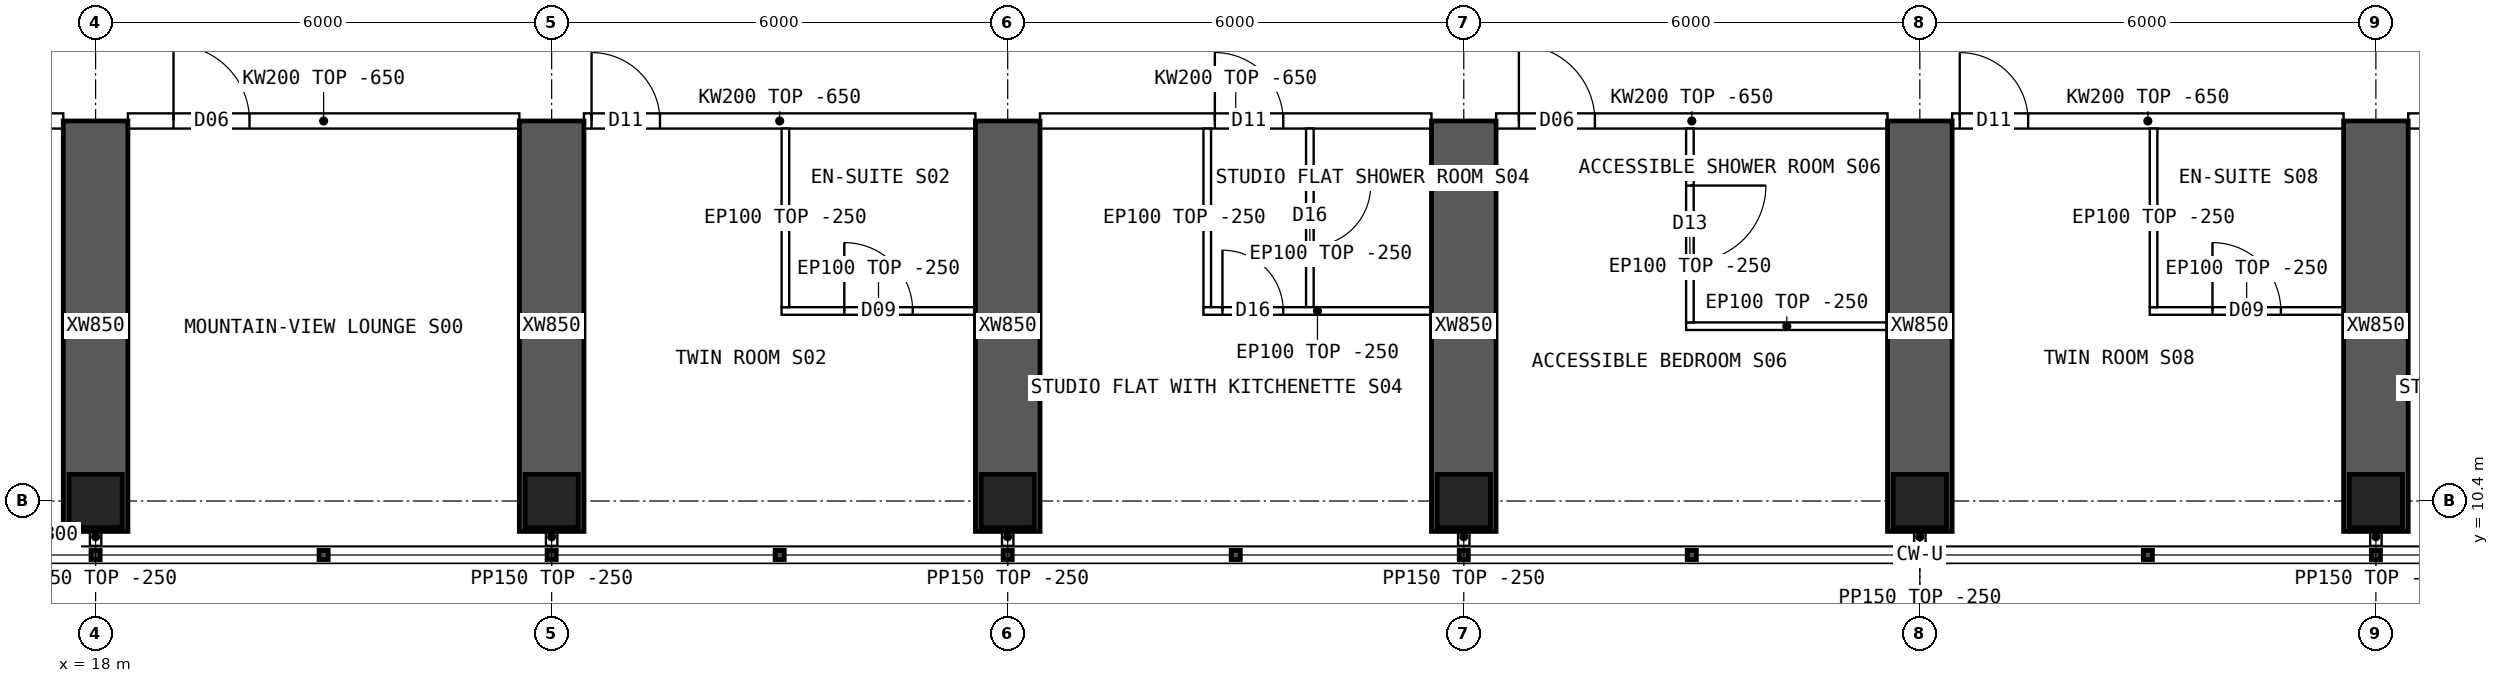
"""IFC4 building model, lengths in metres.
Left out: names, types, materials, properties, quantities, classifications, styles, units other than length and angle.
Written with IfcOpenShell. Run it as: python <this file> out.ifc"""

import sys

from ifc_helpers import new_model, si_unit, direction, frame, frame_2d, origin, origin_2d, place, context, subcontext, project, spatial, polyline, rectangle, hollow_rectangle, outline, extrude, element, fill, save


model = new_model("IFC4")
c1 = context("Model", 3, precision=1e-05, world=origin(), true_north=direction((0.0, 1.0)))
c2 = subcontext(c1, "Body", "Model", "MODEL_VIEW")
j1 = project(units=[si_unit("LENGTHUNIT", "METRE"), si_unit("PLANEANGLEUNIT", "RADIAN")], contexts=[c1])
p1 = place(None, origin())
s1 = spatial("IfcSite", under=j1, at=p1, CompositionType="ELEMENT")
p2 = place(p1, origin())
s2 = spatial("IfcBuilding", under=s1, at=p2, CompositionType="ELEMENT")
p3 = place(p2, frame((0.0, 0.0, 152.35)))
s3 = spatial("IfcBuildingStorey", under=s2, at=p3, CompositionType="ELEMENT", Elevation=152.35)
for number, where, z_axis, x_axis in (
    (1, (18.0, 10.4, 0.0), (0.0, 0.0, 1.0), (1.0, 0.0, 0.0)),
    (2, (24.0, 10.4, 0.0), (0.0, 0.0, 1.0), (1.0, 0.0, 0.0)),
    (3, (30.0, 10.4, 0.0), (0.0, 0.0, 1.0), (1.0, 0.0, 0.0)),
    (4, (36.0, 10.4, 0.0), (0.0, 0.0, 1.0), (1.0, 0.0, 0.0)),
    (5, (42.0, 10.4, 0.0), (0.0, 0.0, 1.0), (1.0, 0.0, 0.0)),
    (6, (48.0, 10.4, 0.0), (0.0, 0.0, 1.0), (1.0, 0.0, 0.0)),
):
    element("IfcColumn", number, at=place(p3, frame(where, z_axis=z_axis, x_axis=x_axis)), inside=s3, PredefinedType="COLUMN", context=c2, shape_type="SweptSolid", body=[
        extrude(hollow_rectangle(XDim=0.7, YDim=0.7, WallThickness=0.07, at=origin_2d()), origin(), (0.0, 0.0, 1.0), 3.75),
    ])
for number, where, z_axis, x_axis in (
    (7, (18.0, 10.0, 0.0), (0.0, 0.0, 1.0), (0.0, 1.0, 0.0)),
    (8, (24.0, 10.0, 0.0), (0.0, 0.0, 1.0), (0.0, 1.0, 0.0)),
    (9, (30.0, 10.0, 0.0), (0.0, 0.0, 1.0), (0.0, 1.0, 0.0)),
    (10, (36.0, 10.0, 0.0), (0.0, 0.0, 1.0), (0.0, 1.0, 0.0)),
    (11, (42.0, 10.0, 0.0), (0.0, 0.0, 1.0), (0.0, 1.0, 0.0)),
    (12, (48.0, 10.0, 0.0), (0.0, 0.0, 1.0), (0.0, 1.0, 0.0)),
):
    element("IfcWall", number, at=place(p3, frame(where, z_axis=z_axis, x_axis=x_axis)), inside=s3, PredefinedType="SHEAR", context=c2, shape_type="SweptSolid", body=[
        extrude(rectangle(XDim=5.4, YDim=0.85, at=frame_2d((2.7, 0.0))), origin(), (0.0, 0.0, 1.0), 3.75),
    ])
p4 = place(p3, frame((17.2, 9.95, 0.0), z_axis=(0.0, 0.0, 1.0), x_axis=(1.0, 0.0, 0.0)))
e13 = element("IfcWall", 13, at=p4, inside=s3, PredefinedType="SOLIDWALL", context=c2, shape_type="SweptSolid", body=[
    extrude(rectangle(XDim=0.375, YDim=0.3, at=frame_2d((0.188, 0.0))), origin(), (0.0, 0.0, 1.0), 3.5),
])
p5 = place(p3, frame((15.6, 15.4, 0.0), z_axis=(0.0, 0.0, 1.0), x_axis=(1.0, 0.0, 0.0)))
e14 = element("IfcWall", 14, at=p5, inside=s3, PredefinedType="SOLIDWALL", context=c2, shape_type="SweptSolid", body=[
    extrude(rectangle(XDim=1.975, YDim=0.2, at=frame_2d((0.987, 0.0))), origin(), (0.0, 0.0, 1.0), 3.5),
])
p6 = place(p5, frame((0.875, 0.0, 0.0)))
e15 = element("IfcOpeningElement", 15, at=p6, cuts=e14, PredefinedType="OPENING", context=c2, shape_type="SweptSolid", body=[
    extrude(rectangle(XDim=0.9, YDim=2.1, at=frame_2d((0.45, 1.05))), frame((0.0, 0.11, 0.0), z_axis=(0.0, -1.0, 0.0), x_axis=(1.0, 0.0, 0.0)), (0.0, 0.0, 1.0), 0.22),
])
p7 = place(p3, frame((18.425, 15.4, 0.0), z_axis=(0.0, 0.0, 1.0), x_axis=(1.0, 0.0, 0.0)))
e16 = element("IfcWall", 16, at=p7, inside=s3, PredefinedType="SOLIDWALL", context=c2, shape_type="SweptSolid", body=[
    extrude(outline(polyline([(0.0, 0.0), (5.15, 0.0), (5.15, 3.1), (0.0, 3.1), (0.0, 0.0)])), frame((0.0, 0.1, 0.0), z_axis=(0.0, -1.0, 0.0), x_axis=(1.0, 0.0, 0.0)), (0.0, 0.0, 1.0), 0.2),
])
p8 = place(p7, frame((0.6, 0.0, 0.0)))
e17 = element("IfcOpeningElement", 17, at=p8, cuts=e16, PredefinedType="OPENING", context=c2, shape_type="SweptSolid", body=[
    extrude(rectangle(XDim=1.0, YDim=2.1, at=frame_2d((0.5, 1.05))), frame((0.0, 0.11, 0.0), z_axis=(0.0, -1.0, 0.0), x_axis=(1.0, 0.0, 0.0)), (0.0, 0.0, 1.0), 0.22),
])
p9 = place(p3, frame((24.425, 15.4, 0.0), z_axis=(0.0, 0.0, 1.0), x_axis=(1.0, 0.0, 0.0)))
e18 = element("IfcWall", 18, at=p9, inside=s3, PredefinedType="SOLIDWALL", context=c2, shape_type="SweptSolid", body=[
    extrude(outline(polyline([(0.0, 0.0), (5.15, 0.0), (5.15, 3.1), (0.0, 3.1), (0.0, 0.0)])), frame((0.0, 0.1, 0.0), z_axis=(0.0, -1.0, 0.0), x_axis=(1.0, 0.0, 0.0)), (0.0, 0.0, 1.0), 0.2),
])
p10 = place(p9, frame((0.1, 0.0, 0.0)))
e19 = element("IfcOpeningElement", 19, at=p10, cuts=e18, PredefinedType="OPENING", context=c2, shape_type="SweptSolid", body=[
    extrude(rectangle(XDim=0.9, YDim=2.1, at=frame_2d((0.45, 1.05))), frame((0.0, 0.11, 0.0), z_axis=(0.0, -1.0, 0.0), x_axis=(1.0, 0.0, 0.0)), (0.0, 0.0, 1.0), 0.22),
])
p11 = place(p3, frame((30.425, 15.4, 0.0), z_axis=(0.0, 0.0, 1.0), x_axis=(1.0, 0.0, 0.0)))
e20 = element("IfcWall", 20, at=p11, inside=s3, PredefinedType="SOLIDWALL", context=c2, shape_type="SweptSolid", body=[
    extrude(outline(polyline([(0.0, 0.0), (5.15, 0.0), (5.15, 3.1), (0.0, 3.1), (0.0, 0.0)])), frame((0.0, 0.1, 0.0), z_axis=(0.0, -1.0, 0.0), x_axis=(1.0, 0.0, 0.0)), (0.0, 0.0, 1.0), 0.2),
])
p12 = place(p11, frame((2.3, 0.0, 0.0)))
e21 = element("IfcOpeningElement", 21, at=p12, cuts=e20, PredefinedType="OPENING", context=c2, shape_type="SweptSolid", body=[
    extrude(rectangle(XDim=0.9, YDim=2.1, at=frame_2d((0.45, 1.05))), frame((0.0, 0.11, 0.0), z_axis=(0.0, -1.0, 0.0), x_axis=(1.0, 0.0, 0.0)), (0.0, 0.0, 1.0), 0.22),
])
p13 = place(p3, frame((36.425, 15.4, 0.0), z_axis=(0.0, 0.0, 1.0), x_axis=(1.0, 0.0, 0.0)))
e22 = element("IfcWall", 22, at=p13, inside=s3, PredefinedType="SOLIDWALL", context=c2, shape_type="SweptSolid", body=[
    extrude(outline(polyline([(0.0, 0.0), (5.15, 0.0), (5.15, 3.1), (0.0, 3.1), (0.0, 0.0)])), frame((0.0, 0.1, 0.0), z_axis=(0.0, -1.0, 0.0), x_axis=(1.0, 0.0, 0.0)), (0.0, 0.0, 1.0), 0.2),
])
p14 = place(p13, frame((0.3, 0.0, 0.0)))
e23 = element("IfcOpeningElement", 23, at=p14, cuts=e22, PredefinedType="OPENING", context=c2, shape_type="SweptSolid", body=[
    extrude(rectangle(XDim=1.0, YDim=2.1, at=frame_2d((0.5, 1.05))), frame((0.0, 0.11, 0.0), z_axis=(0.0, -1.0, 0.0), x_axis=(1.0, 0.0, 0.0)), (0.0, 0.0, 1.0), 0.22),
])
p15 = place(p3, frame((42.425, 15.4, 0.0), z_axis=(0.0, 0.0, 1.0), x_axis=(1.0, 0.0, 0.0)))
e24 = element("IfcWall", 24, at=p15, inside=s3, PredefinedType="SOLIDWALL", context=c2, shape_type="SweptSolid", body=[
    extrude(outline(polyline([(0.0, 0.0), (5.15, 0.0), (5.15, 3.1), (0.0, 3.1), (0.0, 0.0)])), frame((0.0, 0.1, 0.0), z_axis=(0.0, -1.0, 0.0), x_axis=(1.0, 0.0, 0.0)), (0.0, 0.0, 1.0), 0.2),
])
p16 = place(p15, frame((0.1, 0.0, 0.0)))
e25 = element("IfcOpeningElement", 25, at=p16, cuts=e24, PredefinedType="OPENING", context=c2, shape_type="SweptSolid", body=[
    extrude(rectangle(XDim=0.9, YDim=2.1, at=frame_2d((0.45, 1.05))), frame((0.0, 0.11, 0.0), z_axis=(0.0, -1.0, 0.0), x_axis=(1.0, 0.0, 0.0)), (0.0, 0.0, 1.0), 0.22),
])
p17 = place(p3, frame((48.425, 15.4, 0.0), z_axis=(0.0, 0.0, 1.0), x_axis=(1.0, 0.0, 0.0)))
e26 = element("IfcWall", 26, at=p17, inside=s3, PredefinedType="SOLIDWALL", context=c2, shape_type="SweptSolid", body=[
    extrude(outline(polyline([(0.0, 0.0), (5.15, 0.0), (5.15, 3.1), (0.0, 3.1), (0.0, 0.0)])), frame((0.0, 0.1, 0.0), z_axis=(0.0, -1.0, 0.0), x_axis=(1.0, 0.0, 0.0)), (0.0, 0.0, 1.0), 0.2),
])
p18 = place(p17, frame((2.3, 0.0, 0.0)))
e27 = element("IfcOpeningElement", 27, at=p18, cuts=e26, PredefinedType="OPENING", context=c2, shape_type="SweptSolid", body=[
    extrude(rectangle(XDim=0.9, YDim=2.1, at=frame_2d((0.45, 1.05))), frame((0.0, 0.11, 0.0), z_axis=(0.0, -1.0, 0.0), x_axis=(1.0, 0.0, 0.0)), (0.0, 0.0, 1.0), 0.22),
])
p19 = place(p3, frame((29.575, 12.9, 0.0), z_axis=(0.0, 0.0, 1.0), x_axis=(-1.0, 0.0, 0.0)))
e28 = element("IfcWall", 28, at=p19, inside=s3, PredefinedType="PARTITIONING", context=c2, shape_type="SweptSolid", body=[
    extrude(rectangle(XDim=2.55, YDim=0.1, at=frame_2d((1.275, 0.0))), origin(), (0.0, 0.0, 1.0), 3.5),
])
p20 = place(p19, frame((0.825, 0.0, 0.0)))
e29 = element("IfcOpeningElement", 29, at=p20, cuts=e28, PredefinedType="OPENING", context=c2, shape_type="SweptSolid", body=[
    extrude(rectangle(XDim=0.9, YDim=2.1, at=frame_2d((0.45, 1.05))), frame((0.0, 0.06, 0.0), z_axis=(0.0, -1.0, 0.0), x_axis=(1.0, 0.0, 0.0)), (0.0, 0.0, 1.0), 0.12),
])
p21 = place(p3, frame((27.075, 12.95, 0.0), z_axis=(0.0, 0.0, 1.0), x_axis=(0.0, 1.0, 0.0)))
e30 = element("IfcWall", 30, at=p21, inside=s3, PredefinedType="PARTITIONING", context=c2, shape_type="SweptSolid", body=[
    extrude(outline(polyline([(0.0, 0.0), (2.35, 0.0), (2.35, 3.1), (2.302, 3.1), (2.3, 3.5), (0.0, 3.5), (0.0, 0.0)])), frame((0.0, 0.05, 0.0), z_axis=(0.0, -1.0, 0.0), x_axis=(1.0, 0.0, 0.0)), (0.0, 0.0, 1.0), 0.1),
])
p22 = place(p3, frame((35.575, 12.9, 0.0), z_axis=(0.0, 0.0, 1.0), x_axis=(-1.0, 0.0, 0.0)))
e31 = element("IfcWall", 31, at=p22, inside=s3, PredefinedType="PARTITIONING", context=c2, shape_type="SweptSolid", body=[
    extrude(rectangle(XDim=3.0, YDim=0.1, at=frame_2d((1.5, 0.0))), origin(), (0.0, 0.0, 1.0), 3.5),
])
p23 = place(p22, frame((1.95, 0.0, 0.0)))
e32 = element("IfcOpeningElement", 32, at=p23, cuts=e31, PredefinedType="OPENING", context=c2, shape_type="SweptSolid", body=[
    extrude(rectangle(XDim=0.8, YDim=2.1, at=frame_2d((0.4, 1.05))), frame((0.0, 0.06, 0.0), z_axis=(0.0, -1.0, 0.0), x_axis=(1.0, 0.0, 0.0)), (0.0, 0.0, 1.0), 0.12),
])
p24 = place(p3, frame((32.625, 12.95, 0.0), z_axis=(0.0, 0.0, 1.0), x_axis=(0.0, 1.0, 0.0)))
e33 = element("IfcWall", 33, at=p24, inside=s3, PredefinedType="PARTITIONING", context=c2, shape_type="SweptSolid", body=[
    extrude(outline(polyline([(0.0, 0.0), (2.35, 0.0), (2.35, 3.1), (2.302, 3.1), (2.3, 3.5), (0.0, 3.5), (0.0, 0.0)])), frame((0.0, 0.05, 0.0), z_axis=(0.0, -1.0, 0.0), x_axis=(1.0, 0.0, 0.0)), (0.0, 0.0, 1.0), 0.1),
])
p25 = place(p3, frame((33.975, 12.95, 0.0), z_axis=(0.0, 0.0, 1.0), x_axis=(0.0, 1.0, 0.0)))
e34 = element("IfcWall", 34, at=p25, inside=s3, PredefinedType="PARTITIONING", context=c2, shape_type="SweptSolid", body=[
    extrude(outline(polyline([(0.0, 0.0), (2.35, 0.0), (2.35, 3.1), (2.302, 3.1), (2.3, 3.5), (0.0, 3.5), (0.0, 0.0)])), frame((0.0, 0.05, 0.0), z_axis=(0.0, -1.0, 0.0), x_axis=(1.0, 0.0, 0.0)), (0.0, 0.0, 1.0), 0.1),
])
p26 = place(p25, frame((0.8, 0.0, 0.0)))
e35 = element("IfcOpeningElement", 35, at=p26, cuts=e34, PredefinedType="OPENING", context=c2, shape_type="SweptSolid", body=[
    extrude(rectangle(XDim=0.8, YDim=2.1, at=frame_2d((0.4, 1.05))), frame((0.0, 0.06, 0.0), z_axis=(0.0, -1.0, 0.0), x_axis=(1.0, 0.0, 0.0)), (0.0, 0.0, 1.0), 0.12),
])
p27 = place(p3, frame((38.925, 12.7, 0.0), z_axis=(0.0, 0.0, 1.0), x_axis=(1.0, 0.0, 0.0)))
e36 = element("IfcWall", 36, at=p27, inside=s3, PredefinedType="PARTITIONING", context=c2, shape_type="SweptSolid", body=[
    extrude(rectangle(XDim=2.65, YDim=0.1, at=frame_2d((1.325, 0.0))), origin(), (0.0, 0.0, 1.0), 3.5),
])
p28 = place(p3, frame((38.975, 12.75, 0.0), z_axis=(0.0, 0.0, 1.0), x_axis=(0.0, 1.0, 0.0)))
e37 = element("IfcWall", 37, at=p28, inside=s3, PredefinedType="PARTITIONING", context=c2, shape_type="SweptSolid", body=[
    extrude(outline(polyline([(0.0, 0.0), (2.55, 0.0), (2.55, 3.1), (2.502, 3.1), (2.5, 3.5), (0.0, 3.5), (0.0, 0.0)])), frame((0.0, 0.05, 0.0), z_axis=(0.0, -1.0, 0.0), x_axis=(1.0, 0.0, 0.0)), (0.0, 0.0, 1.0), 0.1),
])
p29 = place(p28, frame((0.8, 0.0, 0.0)))
e38 = element("IfcOpeningElement", 38, at=p29, cuts=e37, PredefinedType="OPENING", context=c2, shape_type="SweptSolid", body=[
    extrude(rectangle(XDim=1.0, YDim=2.1, at=frame_2d((0.5, 1.05))), frame((0.0, 0.06, 0.0), z_axis=(0.0, -1.0, 0.0), x_axis=(1.0, 0.0, 0.0)), (0.0, 0.0, 1.0), 0.12),
])
p30 = place(p3, frame((47.575, 12.9, 0.0), z_axis=(0.0, 0.0, 1.0), x_axis=(-1.0, 0.0, 0.0)))
e39 = element("IfcWall", 39, at=p30, inside=s3, PredefinedType="PARTITIONING", context=c2, shape_type="SweptSolid", body=[
    extrude(rectangle(XDim=2.55, YDim=0.1, at=frame_2d((1.275, 0.0))), origin(), (0.0, 0.0, 1.0), 3.5),
])
p31 = place(p30, frame((0.825, 0.0, 0.0)))
e40 = element("IfcOpeningElement", 40, at=p31, cuts=e39, PredefinedType="OPENING", context=c2, shape_type="SweptSolid", body=[
    extrude(rectangle(XDim=0.9, YDim=2.1, at=frame_2d((0.45, 1.05))), frame((0.0, 0.06, 0.0), z_axis=(0.0, -1.0, 0.0), x_axis=(1.0, 0.0, 0.0)), (0.0, 0.0, 1.0), 0.12),
])
p32 = place(p3, frame((45.075, 12.95, 0.0), z_axis=(0.0, 0.0, 1.0), x_axis=(0.0, 1.0, 0.0)))
e41 = element("IfcWall", 41, at=p32, inside=s3, PredefinedType="PARTITIONING", context=c2, shape_type="SweptSolid", body=[
    extrude(outline(polyline([(0.0, 0.0), (2.35, 0.0), (2.35, 3.1), (2.302, 3.1), (2.3, 3.5), (0.0, 3.5), (0.0, 0.0)])), frame((0.0, 0.05, 0.0), z_axis=(0.0, -1.0, 0.0), x_axis=(1.0, 0.0, 0.0)), (0.0, 0.0, 1.0), 0.1),
])
for number, where, z_axis, x_axis in (
    (42, (18.0, 10.05, 0.0), (0.0, 0.0, 1.0), (0.0, -1.0, 0.0)),
    (43, (24.0, 10.05, 0.0), (0.0, 0.0, 1.0), (0.0, -1.0, 0.0)),
    (44, (30.0, 10.05, 0.0), (0.0, 0.0, 1.0), (0.0, -1.0, 0.0)),
    (45, (36.0, 10.05, 0.0), (0.0, 0.0, 1.0), (0.0, -1.0, 0.0)),
    (46, (42.0, 10.05, 0.0), (0.0, 0.0, 1.0), (0.0, -1.0, 0.0)),
    (47, (48.0, 10.05, 0.0), (0.0, 0.0, 1.0), (0.0, -1.0, 0.0)),
):
    element("IfcWall", number, at=place(p3, frame(where, z_axis=z_axis, x_axis=x_axis)), inside=s3, PredefinedType="PARTITIONING", context=c2, shape_type="SweptSolid", body=[
        extrude(rectangle(XDim=0.24, YDim=0.15, at=frame_2d((0.12, 0.0))), origin(), (0.0, 0.0, 1.0), 3.5),
    ])
p33 = place(p8, origin())
e48 = element("IfcDoor", 48, at=p33, inside=s3, OperationType="SINGLE_SWING_LEFT", PredefinedType="DOOR", context=c2, shape_type="SweptSolid", body=[
    extrude(rectangle(XDim=1.0, YDim=2.1, at=frame_2d((0.5, 1.05))), frame((0.0, 0.025, 0.0), z_axis=(0.0, -1.0, 0.0), x_axis=(1.0, 0.0, 0.0)), (0.0, 0.0, 1.0), 0.05),
])
fill(e17, e48)
p34 = place(p20, origin())
e49 = element("IfcDoor", 49, at=p34, inside=s3, OperationType="SINGLE_SWING_RIGHT", PredefinedType="DOOR", context=c2, shape_type="SweptSolid", body=[
    extrude(rectangle(XDim=0.9, YDim=2.1, at=frame_2d((0.45, 1.05))), frame((0.0, 0.025, 0.0), z_axis=(0.0, -1.0, 0.0), x_axis=(1.0, 0.0, 0.0)), (0.0, 0.0, 1.0), 0.05),
])
fill(e29, e49)
p35 = place(p10, origin())
e50 = element("IfcDoor", 50, at=p35, inside=s3, OperationType="SINGLE_SWING_LEFT", PredefinedType="DOOR", context=c2, shape_type="SweptSolid", body=[
    extrude(rectangle(XDim=0.9, YDim=2.1, at=frame_2d((0.45, 1.05))), frame((0.0, 0.025, 0.0), z_axis=(0.0, -1.0, 0.0), x_axis=(1.0, 0.0, 0.0)), (0.0, 0.0, 1.0), 0.05),
])
fill(e19, e50)
p36 = place(p23, origin())
e51 = element("IfcDoor", 51, at=p36, inside=s3, OperationType="SINGLE_SWING_RIGHT", PredefinedType="DOOR", context=c2, shape_type="SweptSolid", body=[
    extrude(rectangle(XDim=0.8, YDim=2.1, at=frame_2d((0.4, 1.05))), frame((0.0, 0.025, 0.0), z_axis=(0.0, -1.0, 0.0), x_axis=(1.0, 0.0, 0.0)), (0.0, 0.0, 1.0), 0.05),
])
fill(e32, e51)
p37 = place(p26, origin())
e52 = element("IfcDoor", 52, at=p37, inside=s3, OperationType="SINGLE_SWING_RIGHT", PredefinedType="DOOR", context=c2, shape_type="SweptSolid", body=[
    extrude(rectangle(XDim=0.8, YDim=2.1, at=frame_2d((0.4, 1.05))), frame((0.0, 0.025, 0.0), z_axis=(0.0, -1.0, 0.0), x_axis=(1.0, 0.0, 0.0)), (0.0, 0.0, 1.0), 0.05),
])
fill(e35, e52)
p38 = place(p12, origin())
e53 = element("IfcDoor", 53, at=p38, inside=s3, OperationType="SINGLE_SWING_LEFT", PredefinedType="DOOR", context=c2, shape_type="SweptSolid", body=[
    extrude(rectangle(XDim=0.9, YDim=2.1, at=frame_2d((0.45, 1.05))), frame((0.0, 0.025, 0.0), z_axis=(0.0, -1.0, 0.0), x_axis=(1.0, 0.0, 0.0)), (0.0, 0.0, 1.0), 0.05),
])
fill(e21, e53)
p39 = place(p29, origin())
e54 = element("IfcDoor", 54, at=p39, inside=s3, OperationType="SINGLE_SWING_RIGHT", PredefinedType="DOOR", context=c2, shape_type="SweptSolid", body=[
    extrude(rectangle(XDim=1.0, YDim=2.1, at=frame_2d((0.5, 1.05))), frame((0.0, 0.025, 0.0), z_axis=(0.0, -1.0, 0.0), x_axis=(1.0, 0.0, 0.0)), (0.0, 0.0, 1.0), 0.05),
])
fill(e38, e54)
p40 = place(p14, origin())
e55 = element("IfcDoor", 55, at=p40, inside=s3, OperationType="SINGLE_SWING_LEFT", PredefinedType="DOOR", context=c2, shape_type="SweptSolid", body=[
    extrude(rectangle(XDim=1.0, YDim=2.1, at=frame_2d((0.5, 1.05))), frame((0.0, 0.025, 0.0), z_axis=(0.0, -1.0, 0.0), x_axis=(1.0, 0.0, 0.0)), (0.0, 0.0, 1.0), 0.05),
])
fill(e23, e55)
p41 = place(p31, origin())
e56 = element("IfcDoor", 56, at=p41, inside=s3, OperationType="SINGLE_SWING_RIGHT", PredefinedType="DOOR", context=c2, shape_type="SweptSolid", body=[
    extrude(rectangle(XDim=0.9, YDim=2.1, at=frame_2d((0.45, 1.05))), frame((0.0, 0.025, 0.0), z_axis=(0.0, -1.0, 0.0), x_axis=(1.0, 0.0, 0.0)), (0.0, 0.0, 1.0), 0.05),
])
fill(e40, e56)
p42 = place(p16, origin())
e57 = element("IfcDoor", 57, at=p42, inside=s3, OperationType="SINGLE_SWING_LEFT", PredefinedType="DOOR", context=c2, shape_type="SweptSolid", body=[
    extrude(rectangle(XDim=0.9, YDim=2.1, at=frame_2d((0.45, 1.05))), frame((0.0, 0.025, 0.0), z_axis=(0.0, -1.0, 0.0), x_axis=(1.0, 0.0, 0.0)), (0.0, 0.0, 1.0), 0.05),
])
fill(e25, e57)
save(model, sys.argv[1])
